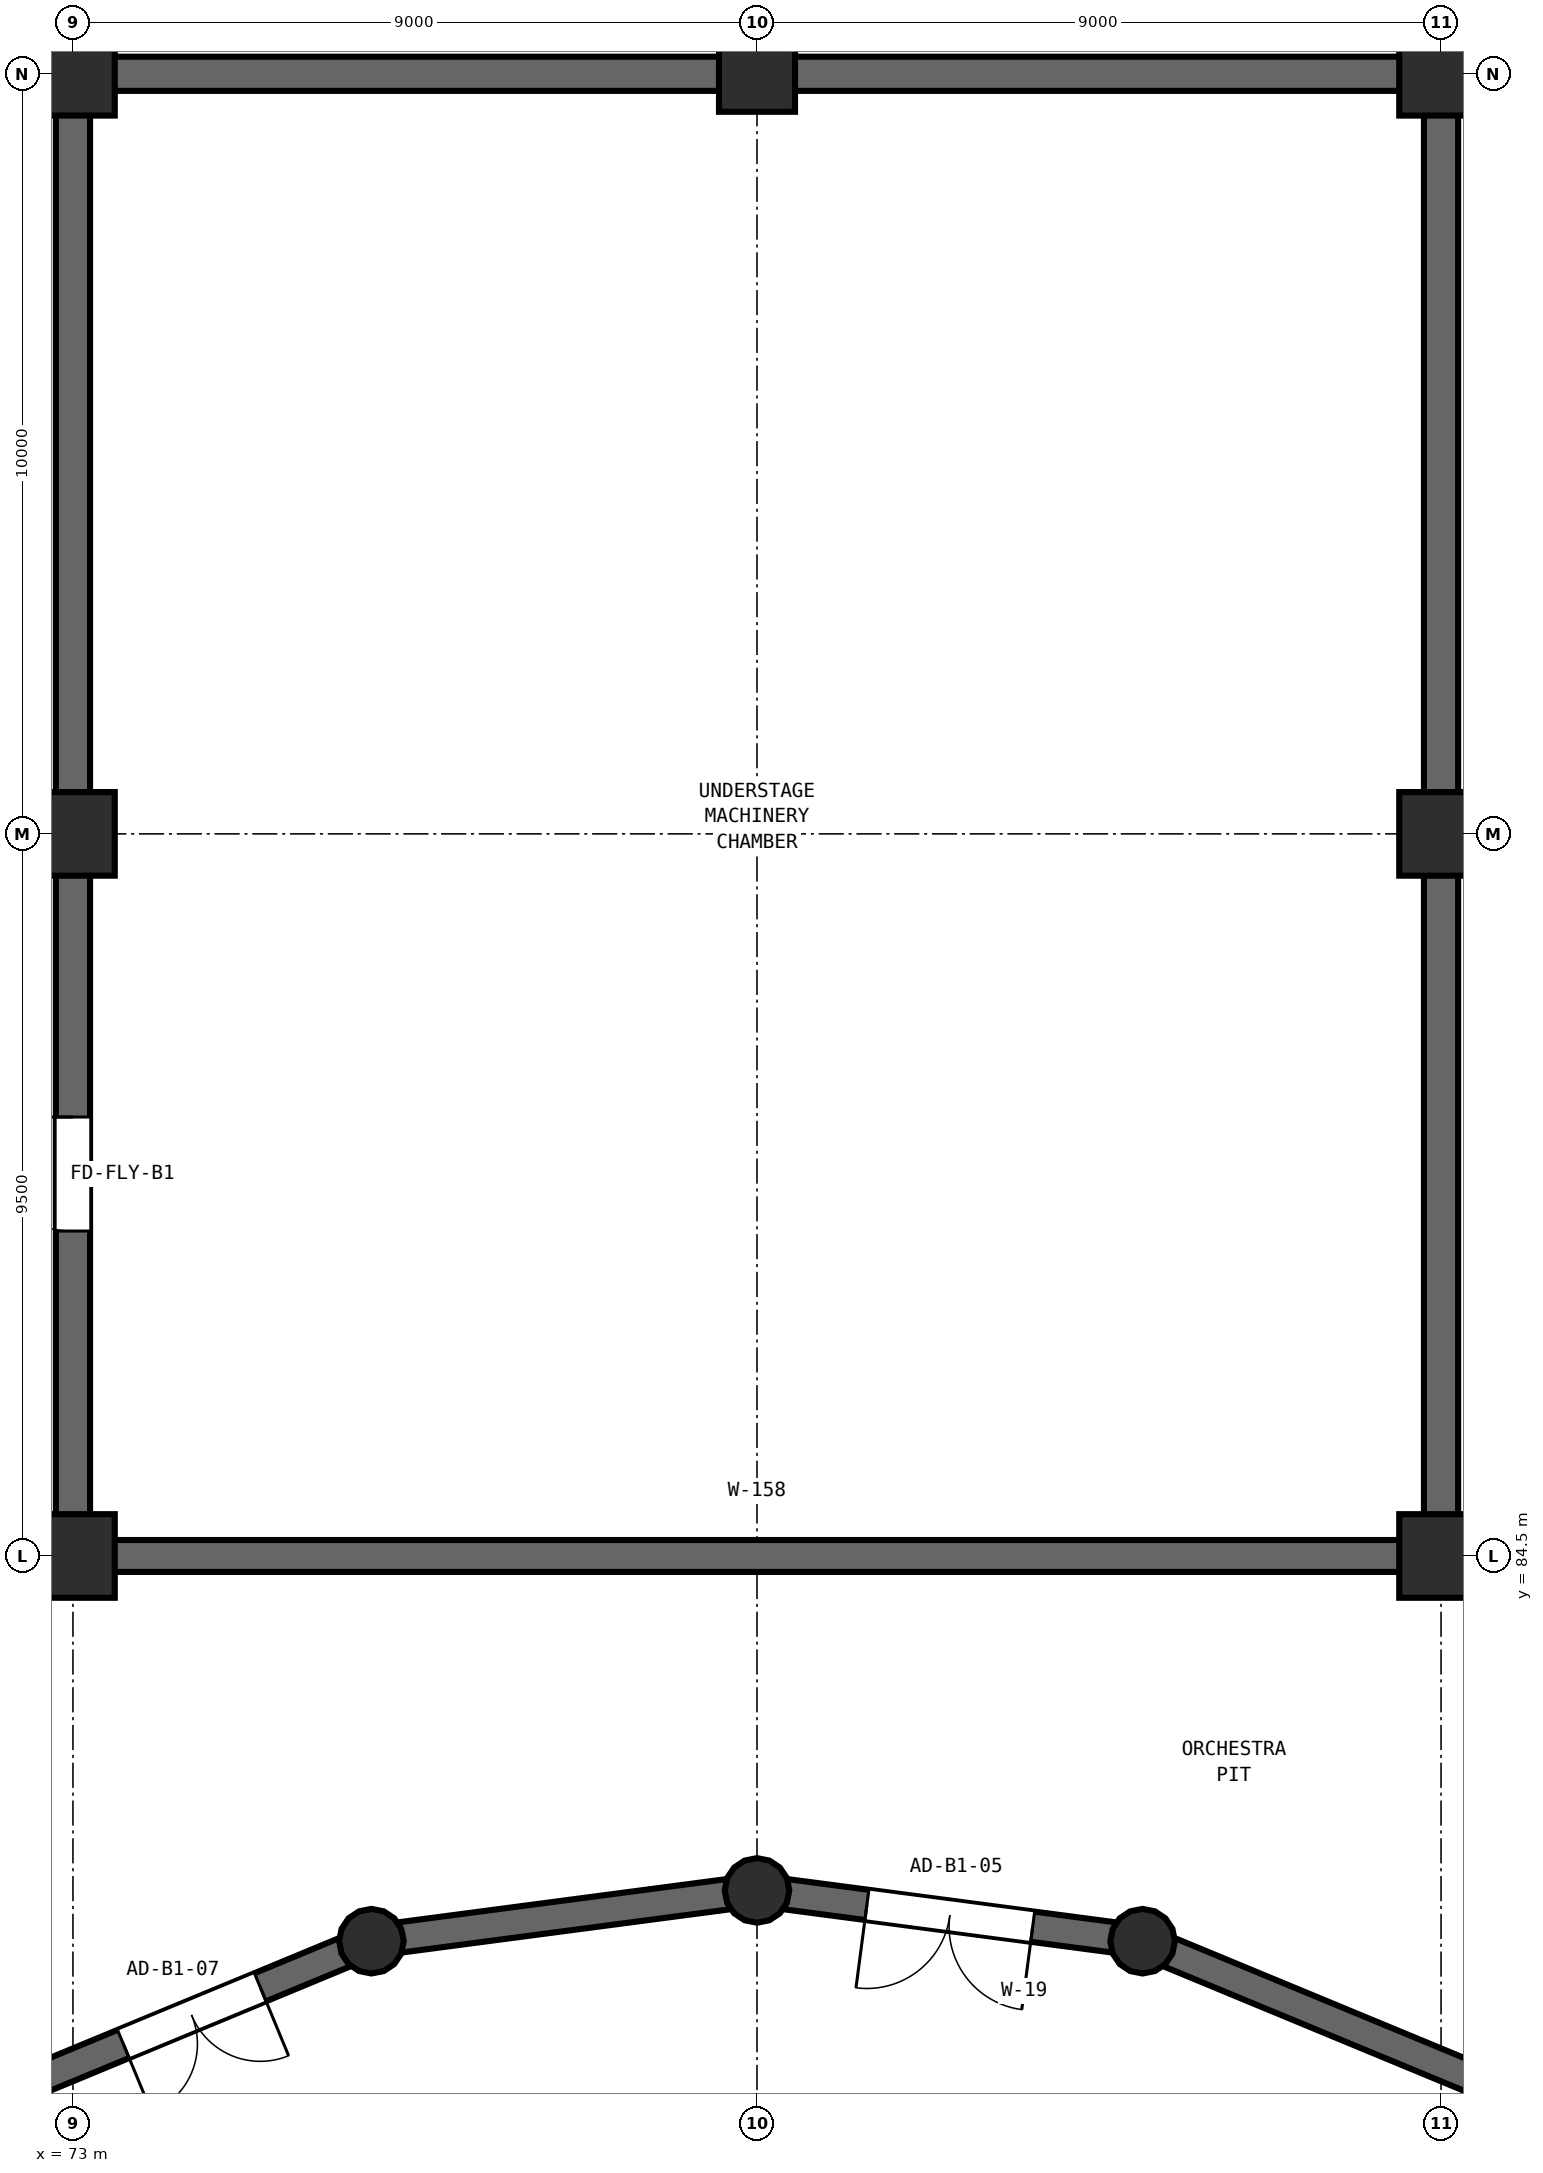
"""IFC4 building model, lengths in metres.
Left out: names, types, materials, properties, quantities, classifications, styles, units other than length and angle.
Written with IfcOpenShell. Run it as: python <this file> out.ifc"""

import sys

from ifc_helpers import new_model, si_unit, direction, frame, frame_2d, origin, origin_2d, place, context, subcontext, project, spatial, rectangle, circle, extrude, element, fill, save


model = new_model("IFC4")
c1 = context("Model", 3, precision=1e-05, world=origin(), true_north=direction((0.0, 1.0)))
c2 = subcontext(c1, "Body", "Model", "MODEL_VIEW")
j1 = project(units=[si_unit("LENGTHUNIT", "METRE"), si_unit("PLANEANGLEUNIT", "RADIAN")], contexts=[c1])
p1 = place(None, origin())
s1 = spatial("IfcSite", under=j1, at=p1, CompositionType="ELEMENT")
p2 = place(p1, origin())
s2 = spatial("IfcBuilding", under=s1, at=p2, CompositionType="ELEMENT")
p3 = place(p2, frame((0.0, 0.0, -4.8)))
s3 = spatial("IfcBuildingStorey", under=s2, at=p3, CompositionType="ELEMENT", Elevation=-4.8)
for number, where, z_axis, x_axis in (
    (1, (73.0, 84.5, -0.4), (0.0, 0.0, 1.0), (1.0, 0.0, 0.0)),
    (2, (73.0, 94.0, -0.4), (0.0, 0.0, 1.0), (1.0, 0.0, 0.0)),
    (3, (73.0, 104.0, -0.4), (0.0, 0.0, 1.0), (1.0, 0.0, 0.0)),
):
    element("IfcColumn", number, at=place(p3, frame(where, z_axis=z_axis, x_axis=x_axis)), inside=s3, PredefinedType="COLUMN", context=c2, shape_type="SweptSolid", body=[
        extrude(rectangle(XDim=1.1, YDim=1.1, at=origin_2d()), origin(), (0.0, 0.0, 1.0), 4.9),
    ])
p4 = place(p3, frame((82.0, 104.0, -0.4), z_axis=(0.0, 0.0, 1.0), x_axis=(1.0, 0.0, 0.0)))
e4 = element("IfcColumn", 4, at=p4, inside=s3, PredefinedType="COLUMN", context=c2, shape_type="SweptSolid", body=[
    extrude(rectangle(XDim=1.0, YDim=1.0, at=origin_2d()), origin(), (0.0, 0.0, 1.0), 4.9),
])
for number, where, z_axis, x_axis in (
    (5, (91.0, 84.5, -0.4), (0.0, 0.0, 1.0), (1.0, 0.0, 0.0)),
    (6, (91.0, 94.0, -0.4), (0.0, 0.0, 1.0), (1.0, 0.0, 0.0)),
    (7, (91.0, 104.0, -0.4), (0.0, 0.0, 1.0), (1.0, 0.0, 0.0)),
):
    element("IfcColumn", number, at=place(p3, frame(where, z_axis=z_axis, x_axis=x_axis)), inside=s3, PredefinedType="COLUMN", context=c2, shape_type="SweptSolid", body=[
        extrude(rectangle(XDim=1.1, YDim=1.1, at=origin_2d()), origin(), (0.0, 0.0, 1.0), 4.9),
    ])
for number, where, z_axis, x_axis in (
    (8, (87.073, 79.432, -0.4), (0.0, 0.0, 1.0), (1.0, 0.0, 0.0)),
    (9, (82.0, 80.1, -0.4), (0.0, 0.0, 1.0), (1.0, 0.0, 0.0)),
    (10, (76.927, 79.432, -0.4), (0.0, 0.0, 1.0), (1.0, 0.0, 0.0)),
):
    element("IfcColumn", number, at=place(p3, frame(where, z_axis=z_axis, x_axis=x_axis)), inside=s3, PredefinedType="COLUMN", context=c2, shape_type="SweptSolid", body=[
        extrude(circle(Radius=0.425, at=origin_2d()), origin(), (0.0, 0.0, 1.0), 4.9),
    ])
p5 = place(p3, frame((91.8, 77.474, 0.0), z_axis=(0.0, 0.0, 1.0), x_axis=(-0.923896452635, 0.382642581018, 0.0)))
e11 = element("IfcWall", 11, at=p5, inside=s3, PredefinedType="SHEAR", context=c2, shape_type="SweptSolid", body=[
    extrude(rectangle(XDim=5.116, YDim=0.4, at=frame_2d((2.558, 0.0))), origin(), (0.0, 0.0, 1.0), 4.5),
])
p6 = place(p3, frame((87.073, 79.432, 0.0), z_axis=(0.0, 0.0, 1.0), x_axis=(-0.99143625958, 0.130591512704, 0.0)))
e12 = element("IfcWall", 12, at=p6, inside=s3, PredefinedType="SHEAR", context=c2, shape_type="SweptSolid", body=[
    extrude(rectangle(XDim=5.117, YDim=0.4, at=frame_2d((2.558, 0.0))), origin(), (0.0, 0.0, 1.0), 4.5),
])
p7 = place(p6, frame((1.458, 0.0, 0.0)))
e13 = element("IfcOpeningElement", 13, at=p7, cuts=e12, PredefinedType="OPENING", context=c2, shape_type="SweptSolid", body=[
    extrude(rectangle(XDim=2.2, YDim=2.45, at=frame_2d((1.1, 1.225))), frame((0.0, 0.21, 0.0), z_axis=(0.0, -1.0, 0.0), x_axis=(1.0, 0.0, 0.0)), (0.0, 0.0, 1.0), 0.42),
])
p8 = place(p3, frame((82.0, 80.1, 0.0), z_axis=(0.0, 0.0, 1.0), x_axis=(-0.99143625958, -0.130591512704, 0.0)))
e14 = element("IfcWall", 14, at=p8, inside=s3, PredefinedType="SHEAR", context=c2, shape_type="SweptSolid", body=[
    extrude(rectangle(XDim=5.117, YDim=0.4, at=frame_2d((2.558, 0.0))), origin(), (0.0, 0.0, 1.0), 4.5),
])
p9 = place(p3, frame((76.927, 79.432, 0.0), z_axis=(0.0, 0.0, 1.0), x_axis=(-0.923896452635, -0.382642581018, 0.0)))
e15 = element("IfcWall", 15, at=p9, inside=s3, PredefinedType="SHEAR", context=c2, shape_type="SweptSolid", body=[
    extrude(rectangle(XDim=5.116, YDim=0.4, at=frame_2d((2.558, 0.0))), origin(), (0.0, 0.0, 1.0), 4.5),
])
p10 = place(p9, frame((1.583, 0.0, 0.0)))
e16 = element("IfcOpeningElement", 16, at=p10, cuts=e15, PredefinedType="OPENING", context=c2, shape_type="SweptSolid", body=[
    extrude(rectangle(XDim=1.95, YDim=2.4, at=frame_2d((0.975, 1.2))), frame((0.0, 0.21, 0.0), z_axis=(0.0, -1.0, 0.0), x_axis=(1.0, 0.0, 0.0)), (0.0, 0.0, 1.0), 0.42),
])
p11 = place(p3, frame((72.775, 104.0, 0.0), z_axis=(0.0, 0.0, 1.0), x_axis=(1.0, 0.0, 0.0)))
e17 = element("IfcWall", 17, at=p11, inside=s3, PredefinedType="SHEAR", context=c2, shape_type="SweptSolid", body=[
    extrude(rectangle(XDim=18.45, YDim=0.45, at=frame_2d((9.225, 0.0))), origin(), (0.0, 0.0, 1.0), 4.8),
])
p12 = place(p3, frame((72.775, 84.5, 0.0), z_axis=(0.0, 0.0, 1.0), x_axis=(1.0, 0.0, 0.0)))
e18 = element("IfcWall", 18, at=p12, inside=s3, PredefinedType="SHEAR", context=c2, shape_type="SweptSolid", body=[
    extrude(rectangle(XDim=18.45, YDim=0.42, at=frame_2d((9.225, 0.0))), origin(), (0.0, 0.0, 1.0), 4.8),
])
p13 = place(p3, frame((73.0, 84.275, 0.0), z_axis=(0.0, 0.0, 1.0), x_axis=(0.0, 1.0, 0.0)))
e19 = element("IfcWall", 19, at=p13, inside=s3, PredefinedType="SHEAR", context=c2, shape_type="SweptSolid", body=[
    extrude(rectangle(XDim=19.95, YDim=0.45, at=frame_2d((9.975, 0.0))), origin(), (0.0, 0.0, 1.0), 4.8),
])
p14 = place(p13, frame((4.5, 0.0, 0.0)))
e20 = element("IfcOpeningElement", 20, at=p14, cuts=e19, PredefinedType="OPENING", context=c2, shape_type="SweptSolid", body=[
    extrude(rectangle(XDim=1.5, YDim=2.2, at=frame_2d((0.75, 1.1))), frame((0.0, 0.235, 0.0), z_axis=(0.0, -1.0, 0.0), x_axis=(1.0, 0.0, 0.0)), (0.0, 0.0, 1.0), 0.47),
])
p15 = place(p3, frame((91.0, 84.275, 0.0), z_axis=(0.0, 0.0, 1.0), x_axis=(0.0, 1.0, 0.0)))
e21 = element("IfcWall", 21, at=p15, inside=s3, PredefinedType="SHEAR", context=c2, shape_type="SweptSolid", body=[
    extrude(rectangle(XDim=19.95, YDim=0.45, at=frame_2d((9.975, 0.0))), origin(), (0.0, 0.0, 1.0), 4.8),
])
p16 = place(p7, origin())
e22 = element("IfcDoor", 22, at=p16, inside=s3, OperationType="DOUBLE_DOOR_SINGLE_SWING", PredefinedType="DOOR", context=c2, shape_type="SweptSolid", body=[
    extrude(rectangle(XDim=2.2, YDim=2.45, at=frame_2d((1.1, 1.225))), frame((0.0, 0.025, 0.0), z_axis=(0.0, -1.0, 0.0), x_axis=(1.0, 0.0, 0.0)), (0.0, 0.0, 1.0), 0.05),
])
fill(e13, e22)
p17 = place(p10, origin())
e23 = element("IfcDoor", 23, at=p17, inside=s3, OperationType="DOUBLE_DOOR_SINGLE_SWING", PredefinedType="DOOR", context=c2, shape_type="SweptSolid", body=[
    extrude(rectangle(XDim=1.95, YDim=2.4, at=frame_2d((0.975, 1.2))), frame((0.0, 0.025, 0.0), z_axis=(0.0, -1.0, 0.0), x_axis=(1.0, 0.0, 0.0)), (0.0, 0.0, 1.0), 0.05),
])
fill(e16, e23)
p18 = place(p14, origin())
e24 = element("IfcDoor", 24, at=p18, inside=s3, OperationType="SINGLE_SWING_RIGHT", PredefinedType="DOOR", context=c2, shape_type="SweptSolid", body=[
    extrude(rectangle(XDim=1.5, YDim=2.2, at=frame_2d((0.75, 1.1))), frame((0.0, 0.025, 0.0), z_axis=(0.0, -1.0, 0.0), x_axis=(1.0, 0.0, 0.0)), (0.0, 0.0, 1.0), 0.05),
])
fill(e20, e24)
save(model, sys.argv[1])
